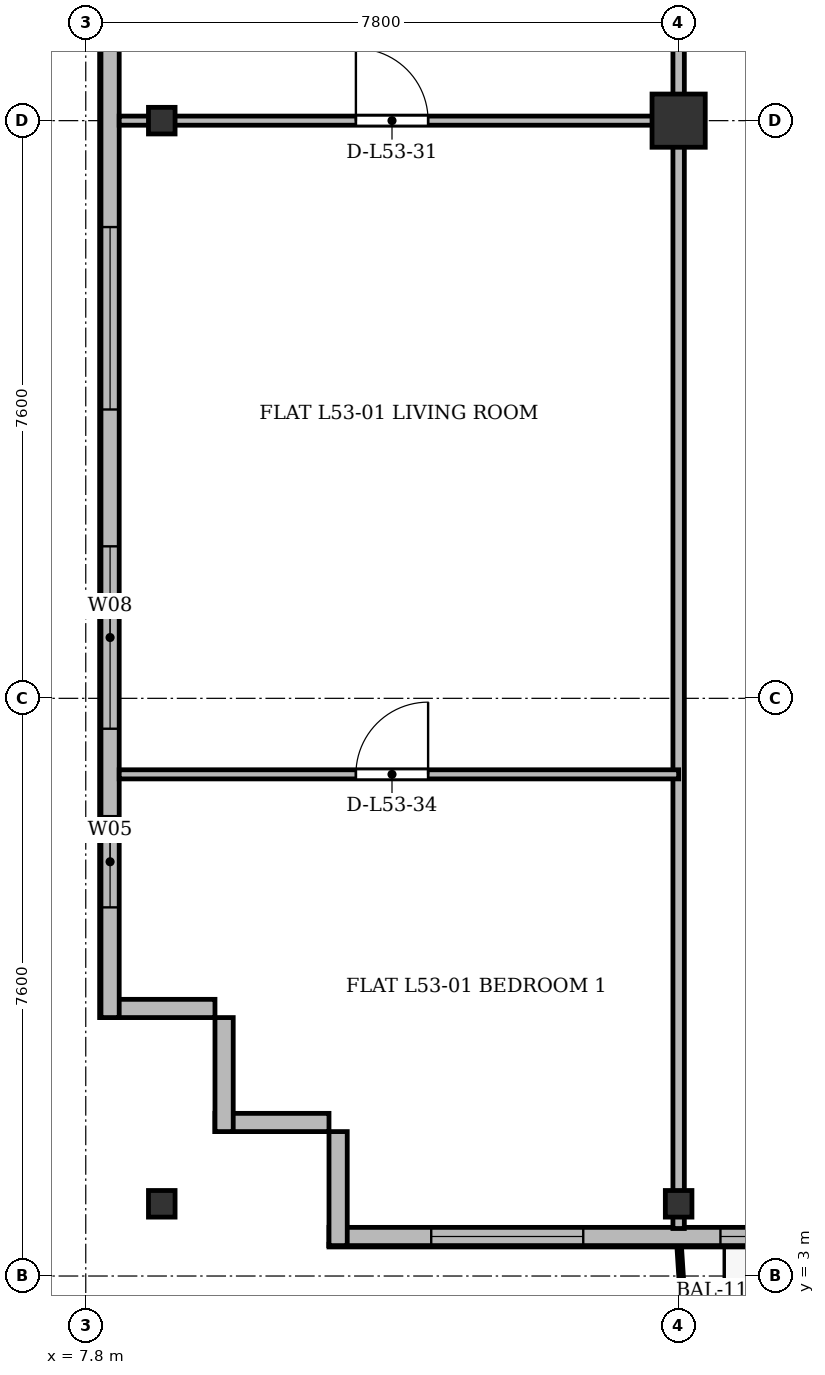
"""IFC4 building model, lengths in metres.
Left out: names, types, materials, properties, quantities, classifications, styles, units other than length and angle.
Written with IfcOpenShell. Run it as: python <this file> out.ifc"""

import sys

from ifc_helpers import new_model, si_unit, direction, frame, frame_2d, origin, origin_2d, place, context, subcontext, project, spatial, rectangle, i_section, extrude, source, transform, mapped, element, fill, save


model = new_model("IFC4")
c1 = context("Model", 3, precision=1e-05, world=origin(), true_north=direction((0.0, 1.0)))
c2 = subcontext(c1, "Body", "Model", "MODEL_VIEW")
j1 = project(units=[si_unit("LENGTHUNIT", "METRE"), si_unit("PLANEANGLEUNIT", "RADIAN")], contexts=[c1])
p1 = place(None, origin())
s1 = spatial("IfcSite", under=j1, at=p1, CompositionType="ELEMENT")
p2 = place(p1, origin())
s2 = spatial("IfcBuilding", under=s1, at=p2, CompositionType="ELEMENT")
p3 = place(p2, frame((0.0, 0.0, 204.9)))
s3 = spatial("IfcBuildingStorey", under=s2, at=p3, CompositionType="ELEMENT", Elevation=204.9)
m1 = source(origin(), c2, "Body", "SweptSolid", [
    extrude(i_section(OverallWidth=0.35, OverallDepth=0.35, WebThickness=0.018, FlangeThickness=0.028, at=origin_2d()), origin(), (0.0, 0.0, 1.0), 3.6),
])
for number, where, z_axis, x_axis in (
    (1, (8.8, 3.95, 0.0), (0.0, 0.0, 1.0), (1.0, 0.0, 0.0)),
    (2, (8.8, 18.2, 0.0), (0.0, 0.0, 1.0), (1.0, 0.0, 0.0)),
    (3, (15.6, 3.95, 0.0), (0.0, 0.0, 1.0), (1.0, 0.0, 0.0)),
):
    element("IfcColumn", number, at=place(p3, frame(where, z_axis=z_axis, x_axis=x_axis)), inside=s3, PredefinedType="COLUMN", context=c2, shape_type="MappedRepresentation", body=[
        mapped(m1, transform((0.0, 0.0, 0.0), x_axis=(1.0, 0.0, 0.0), y_axis=(0.0, 1.0, 0.0), z_axis=(0.0, 0.0, 1.0), scale=1.0)),
    ])
m2 = source(origin(), c2, "Body", "SweptSolid", [
    extrude(rectangle(XDim=0.7, YDim=0.7, at=origin_2d()), origin(), (0.0, 0.0, 1.0), 3.6),
])
p4 = place(p3, frame((15.6, 18.2, 0.0), z_axis=(0.0, 0.0, 1.0), x_axis=(1.0, 0.0, 0.0)))
e4 = element("IfcColumn", 4, at=p4, inside=s3, PredefinedType="COLUMN", context=c2, shape_type="MappedRepresentation", body=[
    mapped(m2, transform((0.0, 0.0, 0.0), x_axis=(1.0, 0.0, 0.0), y_axis=(0.0, 1.0, 0.0), z_axis=(0.0, 0.0, 1.0), scale=1.0)),
])
for number, where, z_axis, x_axis in (
    (5, (11.0, 5.02, 0.0), (0.0, 0.0, 1.0), (-1.0, 0.0, 0.0)),
    (6, (9.62, 4.9, 0.0), (0.0, 0.0, 1.0), (0.0, 1.0, 0.0)),
):
    element("IfcWall", number, at=place(p3, frame(where, z_axis=z_axis, x_axis=x_axis)), inside=s3, PredefinedType="SOLIDWALL", context=c2, shape_type="SweptSolid", body=[
        extrude(rectangle(XDim=1.5, YDim=0.24, at=frame_2d((0.75, 0.0))), origin(), (0.0, 0.0, 1.0), 3.36),
    ])
p5 = place(p3, frame((9.5, 6.52, 0.0), z_axis=(0.0, 0.0, 1.0), x_axis=(-1.0, 0.0, 0.0)))
e7 = element("IfcWall", 7, at=p5, inside=s3, PredefinedType="SOLIDWALL", context=c2, shape_type="SweptSolid", body=[
    extrude(rectangle(XDim=1.5, YDim=0.24, at=frame_2d((0.75, 0.0))), origin(), (0.0, 0.0, 1.0), 2.86),
])
p6 = place(p3, frame((8.12, 6.4, 0.0), z_axis=(0.0, 0.0, 1.0), x_axis=(0.0, 1.0, 0.0)))
e8 = element("IfcWall", 8, at=p6, inside=s3, PredefinedType="SOLIDWALL", context=c2, shape_type="SweptSolid", body=[
    extrude(rectangle(XDim=39.1, YDim=0.24, at=frame_2d((19.55, 0.0))), origin(), (0.0, 0.0, 1.0), 3.36),
])
p7 = place(p6, frame((1.45, 0.0, 0.92)))
e9 = element("IfcOpeningElement", 9, at=p7, cuts=e8, PredefinedType="OPENING", context=c2, shape_type="SweptSolid", body=[
    extrude(rectangle(XDim=1.2, YDim=1.65, at=frame_2d((0.6, 0.825))), frame((0.0, 0.13, 0.0), z_axis=(0.0, -1.0, 0.0), x_axis=(1.0, 0.0, 0.0)), (0.0, 0.0, 1.0), 0.26),
])
p8 = place(p6, frame((3.8, 0.0, 0.92)))
e10 = element("IfcOpeningElement", 10, at=p8, cuts=e8, PredefinedType="OPENING", context=c2, shape_type="SweptSolid", body=[
    extrude(rectangle(XDim=2.4, YDim=2.1, at=frame_2d((1.2, 1.05))), frame((0.0, 0.13, 0.0), z_axis=(0.0, -1.0, 0.0), x_axis=(1.0, 0.0, 0.0)), (0.0, 0.0, 1.0), 0.26),
])
p9 = place(p6, frame((8.0, 0.0, 0.92)))
e11 = element("IfcOpeningElement", 11, at=p9, cuts=e8, PredefinedType="OPENING", context=c2, shape_type="SweptSolid", body=[
    extrude(rectangle(XDim=2.4, YDim=2.1, at=frame_2d((1.2, 1.05))), frame((0.0, 0.13, 0.0), z_axis=(0.0, -1.0, 0.0), x_axis=(1.0, 0.0, 0.0)), (0.0, 0.0, 1.0), 0.26),
])
p10 = place(p6, frame((15.2, 0.0, 0.92)))
e12 = element("IfcOpeningElement", 12, at=p10, cuts=e8, PredefinedType="OPENING", context=c2, shape_type="SweptSolid", body=[
    extrude(rectangle(XDim=2.4, YDim=2.1, at=frame_2d((1.2, 1.05))), frame((0.0, 0.13, 0.0), z_axis=(0.0, -1.0, 0.0), x_axis=(1.0, 0.0, 0.0)), (0.0, 0.0, 1.0), 0.26),
])
p11 = place(p6, frame((33.4, 0.0, 0.92)))
e13 = element("IfcOpeningElement", 13, at=p11, cuts=e8, PredefinedType="OPENING", context=c2, shape_type="SweptSolid", body=[
    extrude(rectangle(XDim=1.2, YDim=1.65, at=frame_2d((0.6, 0.825))), frame((0.0, 0.13, 0.0), z_axis=(0.0, -1.0, 0.0), x_axis=(1.0, 0.0, 0.0)), (0.0, 0.0, 1.0), 0.26),
])
p12 = place(p6, frame((36.75, 0.0, 0.92)))
e14 = element("IfcOpeningElement", 14, at=p12, cuts=e8, PredefinedType="OPENING", context=c2, shape_type="SweptSolid", body=[
    extrude(rectangle(XDim=1.2, YDim=1.65, at=frame_2d((0.6, 0.825))), frame((0.0, 0.13, 0.0), z_axis=(0.0, -1.0, 0.0), x_axis=(1.0, 0.0, 0.0)), (0.0, 0.0, 1.0), 0.26),
])
p13 = place(p3, frame((63.4, 3.52, 0.0), z_axis=(0.0, 0.0, 1.0), x_axis=(-1.0, 0.0, 0.0)))
e15 = element("IfcWall", 15, at=p13, inside=s3, PredefinedType="SOLIDWALL", context=c2, shape_type="SweptSolid", body=[
    extrude(rectangle(XDim=52.4, YDim=0.24, at=frame_2d((26.2, 0.0))), origin(), (0.0, 0.0, 1.0), 3.36),
])
p14 = place(p13, frame((1.345, 0.0, 0.9)))
e16 = element("IfcOpeningElement", 16, at=p14, cuts=e15, PredefinedType="OPENING", context=c2, shape_type="SweptSolid", body=[
    extrude(rectangle(XDim=2.0, YDim=1.95, at=frame_2d((1.0, 0.975))), frame((0.0, 0.13, 0.0), z_axis=(0.0, -1.0, 0.0), x_axis=(1.0, 0.0, 0.0)), (0.0, 0.0, 1.0), 0.26),
])
p15 = place(p13, frame((5.075, 0.0, 0.9)))
e17 = element("IfcOpeningElement", 17, at=p15, cuts=e15, PredefinedType="OPENING", context=c2, shape_type="SweptSolid", body=[
    extrude(rectangle(XDim=1.65, YDim=1.85, at=frame_2d((0.825, 0.925))), frame((0.0, 0.13, 0.0), z_axis=(0.0, -1.0, 0.0), x_axis=(1.0, 0.0, 0.0)), (0.0, 0.0, 1.0), 0.26),
])
p16 = place(p13, frame((7.45, 0.0, 0.9)))
e18 = element("IfcOpeningElement", 18, at=p16, cuts=e15, PredefinedType="OPENING", context=c2, shape_type="SweptSolid", body=[
    extrude(rectangle(XDim=1.5, YDim=1.75, at=frame_2d((0.75, 0.875))), frame((0.0, 0.13, 0.0), z_axis=(0.0, -1.0, 0.0), x_axis=(1.0, 0.0, 0.0)), (0.0, 0.0, 1.0), 0.26),
])
p17 = place(p13, frame((9.7, 0.0, 0.9)))
e19 = element("IfcOpeningElement", 19, at=p17, cuts=e15, PredefinedType="OPENING", context=c2, shape_type="SweptSolid", body=[
    extrude(rectangle(XDim=2.2, YDim=1.8, at=frame_2d((1.1, 0.9))), frame((0.0, 0.13, 0.0), z_axis=(0.0, -1.0, 0.0), x_axis=(1.0, 0.0, 0.0)), (0.0, 0.0, 1.0), 0.26),
])
p18 = place(p13, frame((14.217, 0.0, 0.0)))
e20 = element("IfcOpeningElement", 20, at=p18, cuts=e15, PredefinedType="OPENING", context=c2, shape_type="SweptSolid", body=[
    extrude(rectangle(XDim=1.2, YDim=2.2, at=frame_2d((0.6, 1.1))), frame((0.0, 0.13, 0.0), z_axis=(0.0, -1.0, 0.0), x_axis=(1.0, 0.0, 0.0)), (0.0, 0.0, 1.0), 0.26),
])
p19 = place(p13, frame((19.934, 0.0, 0.9)))
e21 = element("IfcOpeningElement", 21, at=p19, cuts=e15, PredefinedType="OPENING", context=c2, shape_type="SweptSolid", body=[
    extrude(rectangle(XDim=2.0, YDim=1.95, at=frame_2d((1.0, 0.975))), frame((0.0, 0.13, 0.0), z_axis=(0.0, -1.0, 0.0), x_axis=(1.0, 0.0, 0.0)), (0.0, 0.0, 1.0), 0.26),
])
p20 = place(p13, frame((22.775, 0.0, 0.9)))
e22 = element("IfcOpeningElement", 22, at=p20, cuts=e15, PredefinedType="OPENING", context=c2, shape_type="SweptSolid", body=[
    extrude(rectangle(XDim=1.65, YDim=1.85, at=frame_2d((0.825, 0.925))), frame((0.0, 0.13, 0.0), z_axis=(0.0, -1.0, 0.0), x_axis=(1.0, 0.0, 0.0)), (0.0, 0.0, 1.0), 0.26),
])
p21 = place(p13, frame((25.367, 0.0, 0.9)))
e23 = element("IfcOpeningElement", 23, at=p21, cuts=e15, PredefinedType="OPENING", context=c2, shape_type="SweptSolid", body=[
    extrude(rectangle(XDim=1.8, YDim=1.8, at=frame_2d((0.9, 0.9))), frame((0.0, 0.13, 0.0), z_axis=(0.0, -1.0, 0.0), x_axis=(1.0, 0.0, 0.0)), (0.0, 0.0, 1.0), 0.26),
])
p22 = place(p13, frame((29.1, 0.0, 0.9)))
e24 = element("IfcOpeningElement", 24, at=p22, cuts=e15, PredefinedType="OPENING", context=c2, shape_type="SweptSolid", body=[
    extrude(rectangle(XDim=2.2, YDim=1.8, at=frame_2d((1.1, 0.9))), frame((0.0, 0.13, 0.0), z_axis=(0.0, -1.0, 0.0), x_axis=(1.0, 0.0, 0.0)), (0.0, 0.0, 1.0), 0.26),
])
p23 = place(p13, frame((33.25, 0.0, 0.9)))
e25 = element("IfcOpeningElement", 25, at=p23, cuts=e15, PredefinedType="OPENING", context=c2, shape_type="SweptSolid", body=[
    extrude(rectangle(XDim=1.5, YDim=1.75, at=frame_2d((0.75, 0.875))), frame((0.0, 0.13, 0.0), z_axis=(0.0, -1.0, 0.0), x_axis=(1.0, 0.0, 0.0)), (0.0, 0.0, 1.0), 0.26),
])
p24 = place(p13, frame((35.65, 0.0, 0.9)))
e26 = element("IfcOpeningElement", 26, at=p24, cuts=e15, PredefinedType="OPENING", context=c2, shape_type="SweptSolid", body=[
    extrude(rectangle(XDim=1.5, YDim=1.75, at=frame_2d((0.75, 0.875))), frame((0.0, 0.13, 0.0), z_axis=(0.0, -1.0, 0.0), x_axis=(1.0, 0.0, 0.0)), (0.0, 0.0, 1.0), 0.26),
])
p25 = place(p13, frame((37.975, 0.0, 0.9)))
e27 = element("IfcOpeningElement", 27, at=p25, cuts=e15, PredefinedType="OPENING", context=c2, shape_type="SweptSolid", body=[
    extrude(rectangle(XDim=1.65, YDim=1.85, at=frame_2d((0.825, 0.925))), frame((0.0, 0.13, 0.0), z_axis=(0.0, -1.0, 0.0), x_axis=(1.0, 0.0, 0.0)), (0.0, 0.0, 1.0), 0.26),
])
p26 = place(p13, frame((41.456, 0.0, 0.0)))
e28 = element("IfcOpeningElement", 28, at=p26, cuts=e15, PredefinedType="OPENING", context=c2, shape_type="SweptSolid", body=[
    extrude(rectangle(XDim=1.2, YDim=2.2, at=frame_2d((0.6, 1.1))), frame((0.0, 0.13, 0.0), z_axis=(0.0, -1.0, 0.0), x_axis=(1.0, 0.0, 0.0)), (0.0, 0.0, 1.0), 0.26),
])
p27 = place(p13, frame((43.45, 0.0, 0.9)))
e29 = element("IfcOpeningElement", 29, at=p27, cuts=e15, PredefinedType="OPENING", context=c2, shape_type="SweptSolid", body=[
    extrude(rectangle(XDim=1.5, YDim=1.75, at=frame_2d((0.75, 0.875))), frame((0.0, 0.13, 0.0), z_axis=(0.0, -1.0, 0.0), x_axis=(1.0, 0.0, 0.0)), (0.0, 0.0, 1.0), 0.26),
])
p28 = place(p13, frame((45.75, 0.0, 0.9)))
e30 = element("IfcOpeningElement", 30, at=p28, cuts=e15, PredefinedType="OPENING", context=c2, shape_type="SweptSolid", body=[
    extrude(rectangle(XDim=1.5, YDim=1.75, at=frame_2d((0.75, 0.875))), frame((0.0, 0.13, 0.0), z_axis=(0.0, -1.0, 0.0), x_axis=(1.0, 0.0, 0.0)), (0.0, 0.0, 1.0), 0.26),
])
p29 = place(p13, frame((49.055, 0.0, 0.9)))
e31 = element("IfcOpeningElement", 31, at=p29, cuts=e15, PredefinedType="OPENING", context=c2, shape_type="SweptSolid", body=[
    extrude(rectangle(XDim=2.0, YDim=1.95, at=frame_2d((1.0, 0.975))), frame((0.0, 0.13, 0.0), z_axis=(0.0, -1.0, 0.0), x_axis=(1.0, 0.0, 0.0)), (0.0, 0.0, 1.0), 0.26),
])
p30 = place(p3, frame((11.12, 3.4, 0.0), z_axis=(0.0, 0.0, 1.0), x_axis=(0.0, 1.0, 0.0)))
e32 = element("IfcWall", 32, at=p30, inside=s3, PredefinedType="SOLIDWALL", context=c2, shape_type="SweptSolid", body=[
    extrude(rectangle(XDim=1.5, YDim=0.24, at=frame_2d((0.75, 0.0))), origin(), (0.0, 0.0, 1.0), 2.91),
])
p31 = place(p3, frame((15.6, 3.625, 0.0), z_axis=(0.0, 0.0, 1.0), x_axis=(0.0, 1.0, 0.0)))
e33 = element("IfcWall", 33, at=p31, inside=s3, PredefinedType="PARTITIONING", context=c2, shape_type="SweptSolid", body=[
    extrude(rectangle(XDim=27.175, YDim=0.15, at=frame_2d((13.587, 0.0))), origin(), (0.0, 0.0, 1.0), 2.86),
])
p32 = place(p3, frame((8.24, 18.2, 0.0), z_axis=(0.0, 0.0, 1.0), x_axis=(1.0, 0.0, 0.0)))
e34 = element("IfcWall", 34, at=p32, inside=s3, PredefinedType="PARTITIONING", context=c2, shape_type="SweptSolid", body=[
    extrude(rectangle(XDim=7.36, YDim=0.12, at=frame_2d((3.68, 0.0))), origin(), (0.0, 0.0, 1.0), 2.91),
])
p33 = place(p32, frame((3.114, 0.0, 0.0)))
e35 = element("IfcOpeningElement", 35, at=p33, cuts=e34, PredefinedType="OPENING", context=c2, shape_type="SweptSolid", body=[
    extrude(rectangle(XDim=0.95, YDim=2.15, at=frame_2d((0.475, 1.075))), frame((0.0, 0.07, 0.0), z_axis=(0.0, -1.0, 0.0), x_axis=(1.0, 0.0, 0.0)), (0.0, 0.0, 1.0), 0.14),
])
p34 = place(p3, frame((8.24, 9.6, 0.0), z_axis=(0.0, 0.0, 1.0), x_axis=(1.0, 0.0, 0.0)))
e36 = element("IfcWall", 36, at=p34, inside=s3, PredefinedType="PARTITIONING", context=c2, shape_type="SweptSolid", body=[
    extrude(rectangle(XDim=7.36, YDim=0.12, at=frame_2d((3.68, 0.0))), origin(), (0.0, 0.0, 1.0), 2.86),
])
p35 = place(p34, frame((3.114, 0.0, 0.0)))
e37 = element("IfcOpeningElement", 37, at=p35, cuts=e36, PredefinedType="OPENING", context=c2, shape_type="SweptSolid", body=[
    extrude(rectangle(XDim=0.95, YDim=2.15, at=frame_2d((0.475, 1.075))), frame((0.0, 0.07, 0.0), z_axis=(0.0, -1.0, 0.0), x_axis=(1.0, 0.0, 0.0)), (0.0, 0.0, 1.0), 0.14),
])
m3 = source(origin(), c2, "Body", "SweptSolid", [
    extrude(rectangle(XDim=1.2, YDim=1.65, at=frame_2d((0.6, 0.825))), frame((0.0, 0.03, 0.0), z_axis=(0.0, -1.0, 0.0), x_axis=(1.0, 0.0, 0.0)), (0.0, 0.0, 1.0), 0.06),
])
p36 = place(p7, origin())
e38 = element("IfcWindow", 38, at=p36, inside=s3, PartitioningType="SINGLE_PANEL", PredefinedType="WINDOW", context=c2, shape_type="MappedRepresentation", body=[
    mapped(m3, transform((0.0, 0.0, 0.0), x_axis=(1.0, 0.0, 0.0), y_axis=(0.0, 1.0, 0.0), z_axis=(0.0, 0.0, 1.0), scale=1.0)),
])
fill(e9, e38)
m4 = source(origin(), c2, "Body", "SweptSolid", [
    extrude(rectangle(XDim=2.4, YDim=2.1, at=frame_2d((1.2, 1.05))), frame((0.0, 0.03, 0.0), z_axis=(0.0, -1.0, 0.0), x_axis=(1.0, 0.0, 0.0)), (0.0, 0.0, 1.0), 0.06),
])
p37 = place(p8, origin())
e39 = element("IfcWindow", 39, at=p37, inside=s3, PartitioningType="SINGLE_PANEL", PredefinedType="WINDOW", context=c2, shape_type="MappedRepresentation", body=[
    mapped(m4, transform((0.0, 0.0, 0.0), x_axis=(1.0, 0.0, 0.0), y_axis=(0.0, 1.0, 0.0), z_axis=(0.0, 0.0, 1.0), scale=1.0)),
])
fill(e10, e39)
p38 = place(p9, origin())
e40 = element("IfcWindow", 40, at=p38, inside=s3, PartitioningType="SINGLE_PANEL", PredefinedType="WINDOW", context=c2, shape_type="MappedRepresentation", body=[
    mapped(m4, transform((0.0, 0.0, 0.0), x_axis=(1.0, 0.0, 0.0), y_axis=(0.0, 1.0, 0.0), z_axis=(0.0, 0.0, 1.0), scale=1.0)),
])
fill(e11, e40)
m5 = source(origin(), c2, "Body", "SweptSolid", [
    extrude(rectangle(XDim=1.5, YDim=1.75, at=frame_2d((0.75, 0.875))), frame((0.0, 0.03, 0.0), z_axis=(0.0, -1.0, 0.0), x_axis=(1.0, 0.0, 0.0)), (0.0, 0.0, 1.0), 0.06),
])
p39 = place(p28, origin())
e41 = element("IfcWindow", 41, at=p39, inside=s3, PartitioningType="SINGLE_PANEL", PredefinedType="WINDOW", context=c2, shape_type="MappedRepresentation", body=[
    mapped(m5, transform((0.0, 0.0, 0.0), x_axis=(1.0, 0.0, 0.0), y_axis=(0.0, 1.0, 0.0), z_axis=(0.0, 0.0, 1.0), scale=1.0)),
])
fill(e30, e41)
m6 = source(origin(), c2, "Body", "SweptSolid", [
    extrude(rectangle(XDim=2.0, YDim=1.95, at=frame_2d((1.0, 0.975))), frame((0.0, 0.03, 0.0), z_axis=(0.0, -1.0, 0.0), x_axis=(1.0, 0.0, 0.0)), (0.0, 0.0, 1.0), 0.06),
])
p40 = place(p29, origin())
e42 = element("IfcWindow", 42, at=p40, inside=s3, PartitioningType="SINGLE_PANEL", PredefinedType="WINDOW", context=c2, shape_type="MappedRepresentation", body=[
    mapped(m6, transform((0.0, 0.0, 0.0), x_axis=(1.0, 0.0, 0.0), y_axis=(0.0, 1.0, 0.0), z_axis=(0.0, 0.0, 1.0), scale=1.0)),
])
fill(e31, e42)
m7 = source(origin(), c2, "Body", "SweptSolid", [
    extrude(rectangle(XDim=0.95, YDim=2.15, at=frame_2d((0.475, 1.075))), frame((0.0, 0.025, 0.0), z_axis=(0.0, -1.0, 0.0), x_axis=(1.0, 0.0, 0.0)), (0.0, 0.0, 1.0), 0.05),
])
p41 = place(p33, origin())
e43 = element("IfcDoor", 43, at=p41, inside=s3, OperationType="SINGLE_SWING_LEFT", PredefinedType="DOOR", context=c2, shape_type="MappedRepresentation", body=[
    mapped(m7, transform((0.0, 0.0, 0.0), x_axis=(1.0, 0.0, 0.0), y_axis=(0.0, 1.0, 0.0), z_axis=(0.0, 0.0, 1.0), scale=1.0)),
])
fill(e35, e43)
p42 = place(p35, origin())
e44 = element("IfcDoor", 44, at=p42, inside=s3, OperationType="SINGLE_SWING_RIGHT", PredefinedType="DOOR", context=c2, shape_type="MappedRepresentation", body=[
    mapped(m7, transform((0.0, 0.0, 0.0), x_axis=(1.0, 0.0, 0.0), y_axis=(0.0, 1.0, 0.0), z_axis=(0.0, 0.0, 1.0), scale=1.0)),
])
fill(e37, e44)
save(model, sys.argv[1])
